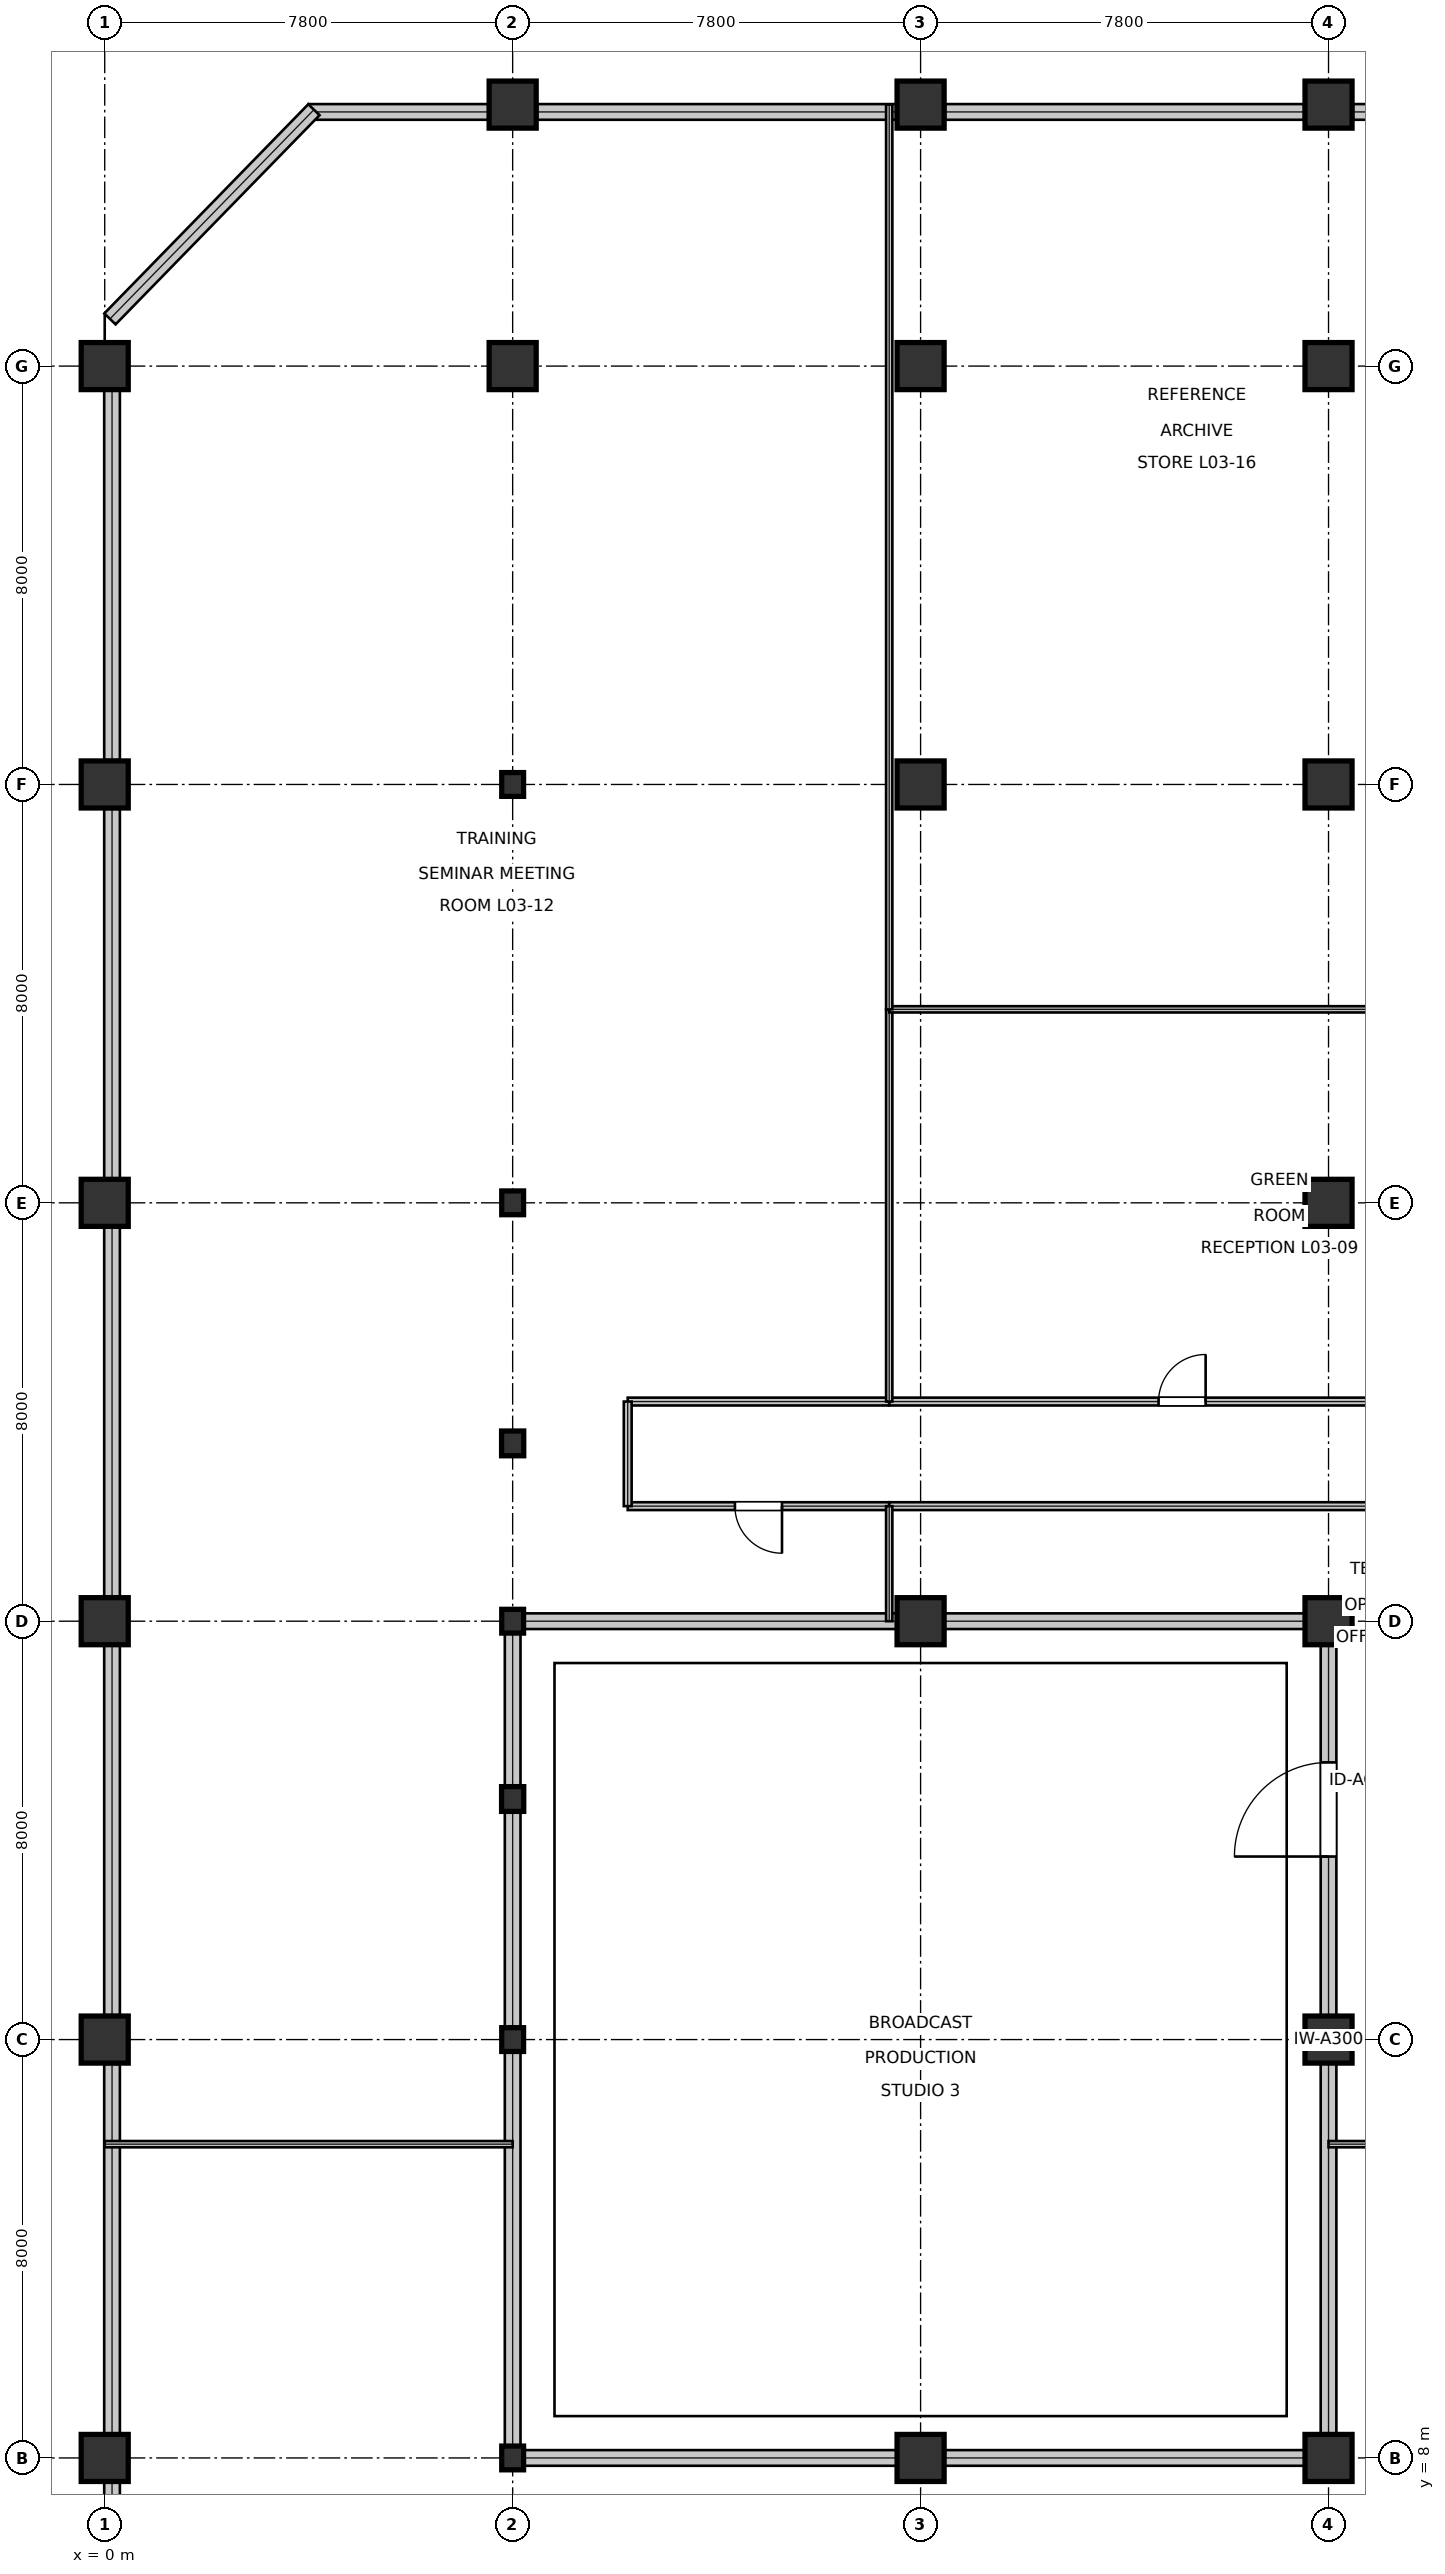
"""IFC4 building model, lengths in metres.
Left out: names, types, materials, properties, quantities, classifications, styles, units other than length and angle.
Written with IfcOpenShell. Run it as: python <this file> out.ifc"""

import sys

from ifc_helpers import new_model, si_unit, direction, frame, frame_2d, origin, origin_2d, place, context, subcontext, project, spatial, rectangle, i_section, extrude, element, fill, save


model = new_model("IFC4")
c1 = context("Model", 3, precision=1e-05, world=origin(), true_north=direction((0.0, 1.0)))
c2 = subcontext(c1, "Body", "Model", "MODEL_VIEW")
j1 = project(units=[si_unit("LENGTHUNIT", "METRE"), si_unit("PLANEANGLEUNIT", "RADIAN")], contexts=[c1])
p1 = place(None, origin())
s1 = spatial("IfcSite", under=j1, at=p1, CompositionType="ELEMENT")
p2 = place(p1, origin())
s2 = spatial("IfcBuilding", under=s1, at=p2, CompositionType="ELEMENT")
p3 = place(p2, frame((0.0, 0.0, 16.2)))
s3 = spatial("IfcBuildingStorey", under=s2, at=p3, CompositionType="ELEMENT", Elevation=16.2)
for number, where, z_axis, x_axis in (
    (1, (0.0, 8.0, 0.0), (0.0, 0.0, 1.0), (1.0, 0.0, 0.0)),
    (2, (0.0, 16.0, 0.0), (0.0, 0.0, 1.0), (1.0, 0.0, 0.0)),
    (3, (0.0, 24.0, 0.0), (0.0, 0.0, 1.0), (1.0, 0.0, 0.0)),
    (4, (0.0, 32.0, 0.0), (0.0, 0.0, 1.0), (1.0, 0.0, 0.0)),
    (5, (0.0, 40.0, 0.0), (0.0, 0.0, 1.0), (1.0, 0.0, 0.0)),
    (6, (0.0, 48.0, 0.0), (0.0, 0.0, 1.0), (1.0, 0.0, 0.0)),
):
    element("IfcColumn", number, at=place(p3, frame(where, z_axis=z_axis, x_axis=x_axis)), inside=s3, PredefinedType="COLUMN", context=c2, shape_type="SweptSolid", body=[
        extrude(rectangle(XDim=0.9, YDim=0.9, at=origin_2d()), origin(), (0.0, 0.0, 1.0), 5.395),
    ])
for number, where, z_axis, x_axis in (
    (7, (7.8, 8.0, 0.0), (0.0, 0.0, 1.0), (1.0, 0.0, 0.0)),
    (8, (7.8, 16.0, 0.0), (0.0, 0.0, 1.0), (1.0, 0.0, 0.0)),
    (9, (7.8, 24.0, 0.0), (0.0, 0.0, 1.0), (1.0, 0.0, 0.0)),
    (10, (7.8, 32.0, 0.0), (0.0, 0.0, 1.0), (1.0, 0.0, 0.0)),
    (11, (7.8, 40.0, 0.0), (0.0, 0.0, 1.0), (1.0, 0.0, 0.0)),
):
    element("IfcColumn", number, at=place(p3, frame(where, z_axis=z_axis, x_axis=x_axis)), inside=s3, PredefinedType="COLUMN", context=c2, shape_type="SweptSolid", body=[
        extrude(i_section(OverallWidth=0.418, OverallDepth=0.455, WebThickness=0.042, FlangeThickness=0.068, at=origin_2d()), origin(), (0.0, 0.0, 1.0), 5.395),
    ])
for number, where, z_axis, x_axis in (
    (12, (7.8, 48.0, 0.0), (0.0, 0.0, 1.0), (1.0, 0.0, 0.0)),
    (13, (7.8, 53.0, 0.0), (0.0, 0.0, 1.0), (1.0, 0.0, 0.0)),
    (14, (15.6, 8.0, 0.0), (0.0, 0.0, 1.0), (1.0, 0.0, 0.0)),
    (15, (15.6, 24.0, 0.0), (0.0, 0.0, 1.0), (1.0, 0.0, 0.0)),
    (16, (15.6, 40.0, 0.0), (0.0, 0.0, 1.0), (1.0, 0.0, 0.0)),
    (17, (15.6, 48.0, 0.0), (0.0, 0.0, 1.0), (1.0, 0.0, 0.0)),
    (18, (15.6, 53.0, 0.0), (0.0, 0.0, 1.0), (1.0, 0.0, 0.0)),
    (19, (23.4, 8.0, 0.0), (0.0, 0.0, 1.0), (1.0, 0.0, 0.0)),
    (20, (23.4, 16.0, 0.0), (0.0, 0.0, 1.0), (1.0, 0.0, 0.0)),
    (21, (23.4, 24.0, 0.0), (0.0, 0.0, 1.0), (1.0, 0.0, 0.0)),
    (22, (23.4, 32.0, 0.0), (0.0, 0.0, 1.0), (1.0, 0.0, 0.0)),
    (23, (23.4, 40.0, 0.0), (0.0, 0.0, 1.0), (1.0, 0.0, 0.0)),
    (24, (23.4, 48.0, 0.0), (0.0, 0.0, 1.0), (1.0, 0.0, 0.0)),
    (25, (23.4, 53.0, 0.0), (0.0, 0.0, 1.0), (1.0, 0.0, 0.0)),
):
    element("IfcColumn", number, at=place(p3, frame(where, z_axis=z_axis, x_axis=x_axis)), inside=s3, PredefinedType="COLUMN", context=c2, shape_type="SweptSolid", body=[
        extrude(rectangle(XDim=0.9, YDim=0.9, at=origin_2d()), origin(), (0.0, 0.0, 1.0), 5.395),
    ])
for number, where, z_axis, x_axis in (
    (26, (7.8, 20.6, 0.0), (0.0, 0.0, 1.0), (1.0, 0.0, 0.0)),
    (27, (7.8, 27.4, 0.0), (0.0, 0.0, 1.0), (1.0, 0.0, 0.0)),
):
    element("IfcColumn", number, at=place(p3, frame(where, z_axis=z_axis, x_axis=x_axis)), inside=s3, PredefinedType="COLUMN", context=c2, shape_type="SweptSolid", body=[
        extrude(i_section(OverallWidth=0.424, OverallDepth=0.474, WebThickness=0.048, FlangeThickness=0.077, at=origin_2d()), origin(), (0.0, 0.0, 1.0), 5.394),
    ])
p4 = place(p3, frame((30.732, 52.86, 0.0), z_axis=(0.0, 0.0, 1.0), x_axis=(-1.0, 0.0, 0.0)))
e28 = element("IfcWall", 28, at=p4, inside=s3, PredefinedType="STANDARD", context=c2, shape_type="SweptSolid", body=[
    extrude(rectangle(XDim=6.864, YDim=0.3, at=frame_2d((3.432, 0.0))), origin(), (0.0, 0.0, 1.0), 4.648),
])
p5 = place(p3, frame((22.932, 52.86, 0.0), z_axis=(0.0, 0.0, 1.0), x_axis=(-1.0, 0.0, 0.0)))
e29 = element("IfcWall", 29, at=p5, inside=s3, PredefinedType="STANDARD", context=c2, shape_type="SweptSolid", body=[
    extrude(rectangle(XDim=6.864, YDim=0.3, at=frame_2d((3.432, 0.0))), origin(), (0.0, 0.0, 1.0), 4.648),
])
p6 = place(p3, frame((15.132, 52.86, 0.0), z_axis=(0.0, 0.0, 1.0), x_axis=(-1.0, 0.0, 0.0)))
e30 = element("IfcWall", 30, at=p6, inside=s3, PredefinedType="STANDARD", context=c2, shape_type="SweptSolid", body=[
    extrude(rectangle(XDim=6.864, YDim=0.3, at=frame_2d((3.432, 0.0))), origin(), (0.0, 0.0, 1.0), 4.648),
])
p7 = place(p3, frame((7.332, 52.86, 0.0), z_axis=(0.0, 0.0, 1.0), x_axis=(-1.0, 0.0, 0.0)))
e31 = element("IfcWall", 31, at=p7, inside=s3, PredefinedType="STANDARD", context=c2, shape_type="SweptSolid", body=[
    extrude(rectangle(XDim=3.432, YDim=0.3, at=frame_2d((1.716, 0.0))), origin(), (0.0, 0.0, 1.0), 5.12),
])
p8 = place(p3, frame((4.0, 52.902, 0.0), z_axis=(0.0, 0.0, 1.0), x_axis=(-0.698113577969, -0.71598703358, 0.0)))
e32 = element("IfcWall", 32, at=p8, inside=s3, PredefinedType="STANDARD", context=c2, shape_type="SweptSolid", body=[
    extrude(rectangle(XDim=5.587, YDim=0.3, at=frame_2d((2.793, 0.0))), origin(), (0.0, 0.0, 1.0), 5.12),
])
for number, where, z_axis, x_axis in (
    (33, (0.14, 47.532, 0.0), (0.0, 0.0, 1.0), (0.0, -1.0, 0.0)),
    (34, (0.14, 39.532, 0.0), (0.0, 0.0, 1.0), (0.0, -1.0, 0.0)),
    (35, (0.14, 31.532, 0.0), (0.0, 0.0, 1.0), (0.0, -1.0, 0.0)),
    (36, (0.14, 23.532, 0.0), (0.0, 0.0, 1.0), (0.0, -1.0, 0.0)),
    (37, (0.14, 15.532, 0.0), (0.0, 0.0, 1.0), (0.0, -1.0, 0.0)),
    (38, (0.14, 7.532, 0.0), (0.0, 0.0, 1.0), (0.0, -1.0, 0.0)),
):
    element("IfcWall", number, at=place(p3, frame(where, z_axis=z_axis, x_axis=x_axis)), inside=s3, PredefinedType="STANDARD", context=c2, shape_type="SweptSolid", body=[
        extrude(rectangle(XDim=7.064, YDim=0.3, at=frame_2d((3.532, 0.0))), origin(), (0.0, 0.0, 1.0), 4.648),
    ])
p9 = place(p3, frame((23.4, 8.0, 0.0), z_axis=(0.0, 0.0, 1.0), x_axis=(0.0, 1.0, 0.0)))
e39 = element("IfcWall", 39, at=p9, inside=s3, PredefinedType="PARTITIONING", context=c2, shape_type="SweptSolid", body=[
    extrude(rectangle(XDim=16.0, YDim=0.3, at=frame_2d((8.0, 0.0))), origin(), (0.0, 0.0, 1.0), 3.688),
])
p10 = place(p9, frame((11.5, 0.0, 0.0)))
e40 = element("IfcOpeningElement", 40, at=p10, cuts=e39, PredefinedType="OPENING", context=c2, shape_type="SweptSolid", body=[
    extrude(rectangle(XDim=1.8, YDim=2.4, at=frame_2d((0.9, 1.2))), frame((0.0, 0.16, 0.0), z_axis=(0.0, -1.0, 0.0), x_axis=(1.0, 0.0, 0.0)), (0.0, 0.0, 1.0), 0.32),
])
for number, where, z_axis, x_axis in (
    (41, (7.8, 24.0, 0.0), (0.0, 0.0, 1.0), (1.0, 0.0, 0.0)),
    (42, (7.8, 8.0, 0.0), (0.0, 0.0, 1.0), (1.0, 0.0, 0.0)),
):
    element("IfcWall", number, at=place(p3, frame(where, z_axis=z_axis, x_axis=x_axis)), inside=s3, PredefinedType="PARTITIONING", context=c2, shape_type="SweptSolid", body=[
        extrude(rectangle(XDim=15.6, YDim=0.3, at=frame_2d((7.8, 0.0))), origin(), (0.0, 0.0, 1.0), 3.688),
    ])
p11 = place(p3, frame((7.8, 8.0, 0.0), z_axis=(0.0, 0.0, 1.0), x_axis=(0.0, 1.0, 0.0)))
e43 = element("IfcWall", 43, at=p11, inside=s3, PredefinedType="PARTITIONING", context=c2, shape_type="SweptSolid", body=[
    extrude(rectangle(XDim=16.0, YDim=0.3, at=frame_2d((8.0, 0.0))), origin(), (0.0, 0.0, 1.0), 3.688),
])
p12 = place(p3, frame((15.0, 28.2, 0.0), z_axis=(0.0, 0.0, 1.0), x_axis=(1.0, 0.0, 0.0)))
e44 = element("IfcWall", 44, at=p12, inside=s3, PredefinedType="PARTITIONING", context=c2, shape_type="SweptSolid", body=[
    extrude(rectangle(XDim=11.2, YDim=0.15, at=frame_2d((5.6, 0.0))), origin(), (0.0, 0.0, 1.0), 3.688),
])
p13 = place(p12, frame((5.15, 0.0, 0.0)))
e45 = element("IfcOpeningElement", 45, at=p13, cuts=e44, PredefinedType="OPENING", context=c2, shape_type="SweptSolid", body=[
    extrude(rectangle(XDim=0.9, YDim=2.15, at=frame_2d((0.45, 1.075))), frame((0.0, 0.085, 0.0), z_axis=(0.0, -1.0, 0.0), x_axis=(1.0, 0.0, 0.0)), (0.0, 0.0, 1.0), 0.17),
])
p14 = place(p3, frame((10.0, 26.2, 0.0), z_axis=(0.0, 0.0, 1.0), x_axis=(1.0, 0.0, 0.0)))
e46 = element("IfcWall", 46, at=p14, inside=s3, PredefinedType="PARTITIONING", context=c2, shape_type="SweptSolid", body=[
    extrude(rectangle(XDim=5.0, YDim=0.15, at=frame_2d((2.5, 0.0))), origin(), (0.0, 0.0, 1.0), 5.12),
])
p15 = place(p14, frame((2.05, 0.0, 0.0)))
e47 = element("IfcOpeningElement", 47, at=p15, cuts=e46, PredefinedType="OPENING", context=c2, shape_type="SweptSolid", body=[
    extrude(rectangle(XDim=0.9, YDim=2.15, at=frame_2d((0.45, 1.075))), frame((0.0, 0.085, 0.0), z_axis=(0.0, -1.0, 0.0), x_axis=(1.0, 0.0, 0.0)), (0.0, 0.0, 1.0), 0.17),
])
p16 = place(p3, frame((15.0, 26.2, 0.0), z_axis=(0.0, 0.0, 1.0), x_axis=(1.0, 0.0, 0.0)))
e48 = element("IfcWall", 48, at=p16, inside=s3, PredefinedType="PARTITIONING", context=c2, shape_type="SweptSolid", body=[
    extrude(rectangle(XDim=11.2, YDim=0.15, at=frame_2d((5.6, 0.0))), origin(), (0.0, 0.0, 1.0), 3.688),
])
p17 = place(p3, frame((10.0, 28.2, 0.0), z_axis=(0.0, 0.0, 1.0), x_axis=(1.0, 0.0, 0.0)))
e49 = element("IfcWall", 49, at=p17, inside=s3, PredefinedType="PARTITIONING", context=c2, shape_type="SweptSolid", body=[
    extrude(rectangle(XDim=5.0, YDim=0.15, at=frame_2d((2.5, 0.0))), origin(), (0.0, 0.0, 1.0), 5.12),
])
p18 = place(p3, frame((10.0, 26.2, 0.0), z_axis=(0.0, 0.0, 1.0), x_axis=(0.0, 1.0, 0.0)))
e50 = element("IfcWall", 50, at=p18, inside=s3, PredefinedType="PARTITIONING", context=c2, shape_type="SweptSolid", body=[
    extrude(rectangle(XDim=2.0, YDim=0.15, at=frame_2d((1.0, 0.0))), origin(), (0.0, 0.0, 1.0), 5.12),
])
p19 = place(p3, frame((23.4, 14.0, 0.0), z_axis=(0.0, 0.0, 1.0), x_axis=(1.0, 0.0, 0.0)))
e51 = element("IfcWall", 51, at=p19, inside=s3, PredefinedType="PARTITIONING", context=c2, shape_type="SweptSolid", body=[
    extrude(rectangle(XDim=2.8, YDim=0.12, at=frame_2d((1.4, 0.0))), origin(), (0.0, 0.0, 1.0), 5.12),
])
p20 = place(p3, frame((0.0, 14.0, 0.0), z_axis=(0.0, 0.0, 1.0), x_axis=(1.0, 0.0, 0.0)))
e52 = element("IfcWall", 52, at=p20, inside=s3, PredefinedType="PARTITIONING", context=c2, shape_type="SweptSolid", body=[
    extrude(rectangle(XDim=7.8, YDim=0.12, at=frame_2d((3.9, 0.0))), origin(), (0.0, 0.0, 1.0), 5.12),
])
p21 = place(p3, frame((15.0, 24.0, 0.0), z_axis=(0.0, 0.0, 1.0), x_axis=(0.0, 1.0, 0.0)))
e53 = element("IfcWall", 53, at=p21, inside=s3, PredefinedType="PARTITIONING", context=c2, shape_type="SweptSolid", body=[
    extrude(rectangle(XDim=2.2, YDim=0.12, at=frame_2d((1.1, 0.0))), origin(), (0.0, 0.0, 1.0), 4.338),
])
p22 = place(p3, frame((15.0, 28.2, 0.0), z_axis=(0.0, 0.0, 1.0), x_axis=(0.0, 1.0, 0.0)))
e54 = element("IfcWall", 54, at=p22, inside=s3, PredefinedType="PARTITIONING", context=c2, shape_type="SweptSolid", body=[
    extrude(rectangle(XDim=7.5, YDim=0.12, at=frame_2d((3.75, 0.0))), origin(), (0.0, 0.0, 1.0), 3.688),
])
p23 = place(p3, frame((15.0, 35.7, 0.0), z_axis=(0.0, 0.0, 1.0), x_axis=(1.0, 0.0, 0.0)))
e55 = element("IfcWall", 55, at=p23, inside=s3, PredefinedType="PARTITIONING", context=c2, shape_type="SweptSolid", body=[
    extrude(rectangle(XDim=11.2, YDim=0.12, at=frame_2d((5.6, 0.0))), origin(), (0.0, 0.0, 1.0), 3.688),
])
p24 = place(p3, frame((15.0, 35.7, 0.0), z_axis=(0.0, 0.0, 1.0), x_axis=(0.0, 1.0, 0.0)))
e56 = element("IfcWall", 56, at=p24, inside=s3, PredefinedType="PARTITIONING", context=c2, shape_type="SweptSolid", body=[
    extrude(rectangle(XDim=17.3, YDim=0.12, at=frame_2d((8.65, 0.0))), origin(), (0.0, 0.0, 1.0), 4.338),
])
p25 = place(p10, origin())
e57 = element("IfcDoor", 57, at=p25, inside=s3, OperationType="SINGLE_SWING_LEFT", PredefinedType="DOOR", context=c2, shape_type="SweptSolid", body=[
    extrude(rectangle(XDim=1.8, YDim=2.4, at=frame_2d((0.9, 1.2))), frame((0.0, 0.025, 0.0), z_axis=(0.0, -1.0, 0.0), x_axis=(1.0, 0.0, 0.0)), (0.0, 0.0, 1.0), 0.05),
])
fill(e40, e57)
p26 = place(p13, origin())
e58 = element("IfcDoor", 58, at=p26, inside=s3, OperationType="SINGLE_SWING_RIGHT", PredefinedType="DOOR", context=c2, shape_type="SweptSolid", body=[
    extrude(rectangle(XDim=0.9, YDim=2.15, at=frame_2d((0.45, 1.075))), frame((0.0, 0.025, 0.0), z_axis=(0.0, -1.0, 0.0), x_axis=(1.0, 0.0, 0.0)), (0.0, 0.0, 1.0), 0.05),
])
fill(e45, e58)
p27 = place(p15, frame((0.9, 0.0, 0.0), z_axis=(0.0, 0.0, 1.0), x_axis=(-1.0, 0.0, 0.0)))
e59 = element("IfcDoor", 59, at=p27, inside=s3, OperationType="SINGLE_SWING_LEFT", PredefinedType="DOOR", context=c2, shape_type="SweptSolid", body=[
    extrude(rectangle(XDim=0.9, YDim=2.15, at=frame_2d((0.45, 1.075))), frame((0.0, 0.025, 0.0), z_axis=(0.0, -1.0, 0.0), x_axis=(1.0, 0.0, 0.0)), (0.0, 0.0, 1.0), 0.05),
])
fill(e47, e59)
save(model, sys.argv[1])
